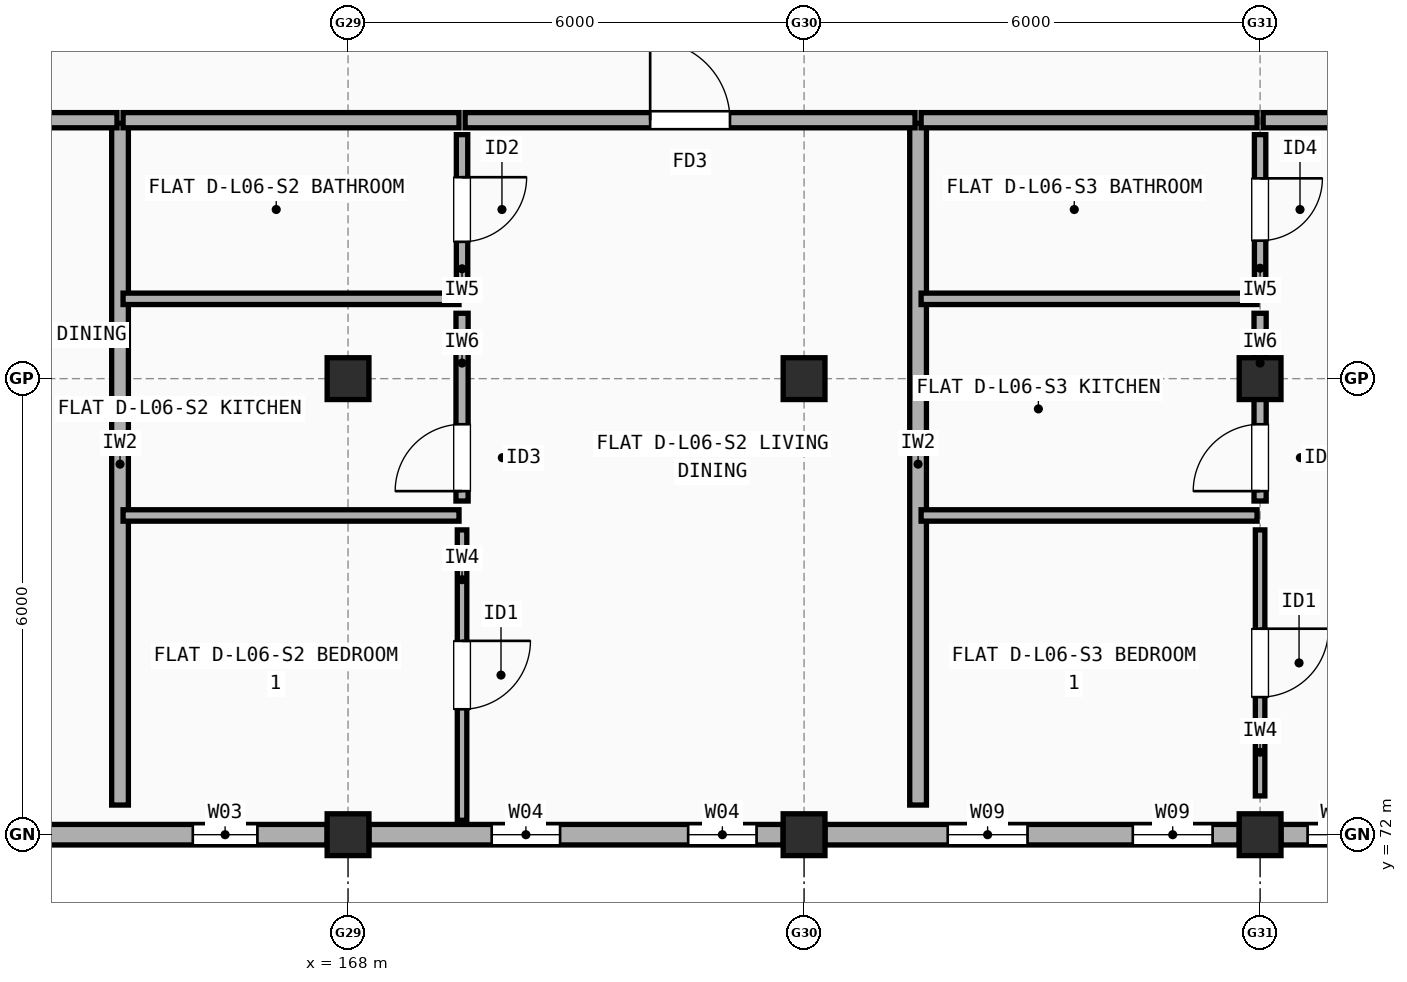
"""IFC4 building model, lengths in metres.
Left out: names, types, materials, properties, quantities, classifications, styles, units other than length and angle.
Written with IfcOpenShell. Run it as: python <this file> out.ifc"""

import sys

from ifc_helpers import new_model, si_unit, direction, frame, frame_2d, origin, origin_2d, place, context, subcontext, project, spatial, rectangle, extrude, element, fill, save


model = new_model("IFC4")
c1 = context("Model", 3, precision=1e-05, world=origin(), true_north=direction((0.0, 1.0)))
c2 = subcontext(c1, "Body", "Model", "MODEL_VIEW")
j1 = project(units=[si_unit("LENGTHUNIT", "METRE"), si_unit("PLANEANGLEUNIT", "RADIAN")], contexts=[c1])
p1 = place(None, origin())
s1 = spatial("IfcSite", under=j1, at=p1, CompositionType="ELEMENT")
p2 = place(p1, origin())
s2 = spatial("IfcBuilding", under=s1, at=p2, CompositionType="ELEMENT")
p3 = place(p2, frame((0.0, 0.0, 20.5)))
s3 = spatial("IfcBuildingStorey", under=s2, at=p3, CompositionType="ELEMENT", Elevation=20.5)
for number, where, z_axis, x_axis in (
    (1, (168.0, 72.0, 0.0), (0.0, 0.0, 1.0), (1.0, 0.0, 0.0)),
    (2, (168.0, 78.0, 0.0), (0.0, 0.0, 1.0), (1.0, 0.0, 0.0)),
    (3, (174.0, 72.0, 0.0), (0.0, 0.0, 1.0), (1.0, 0.0, 0.0)),
    (4, (174.0, 78.0, 0.0), (0.0, 0.0, 1.0), (1.0, 0.0, 0.0)),
    (5, (180.0, 72.0, 0.0), (0.0, 0.0, 1.0), (1.0, 0.0, 0.0)),
    (6, (180.0, 78.0, 0.0), (0.0, 0.0, 1.0), (1.0, 0.0, 0.0)),
):
    element("IfcColumn", number, at=place(p3, frame(where, z_axis=z_axis, x_axis=x_axis)), inside=s3, PredefinedType="COLUMN", context=c2, shape_type="SweptSolid", body=[
        extrude(rectangle(XDim=0.55, YDim=0.55, at=origin_2d()), origin(), (0.0, 0.0, 1.0), 2.97),
    ])
p4 = place(p3, frame((162.275, 72.0, 0.0), z_axis=(0.0, 0.0, 1.0), x_axis=(1.0, 0.0, 0.0)))
e7 = element("IfcWall", 7, at=p4, inside=s3, PredefinedType="STANDARD", context=c2, shape_type="SweptSolid", body=[
    extrude(rectangle(XDim=5.45, YDim=0.27, at=frame_2d((2.725, 0.0))), origin(), (0.0, 0.0, 1.0), 2.452),
])
p5 = place(p4, frame((0.942, 0.0, 0.9)))
e8 = element("IfcOpeningElement", 8, at=p5, cuts=e7, PredefinedType="OPENING", context=c2, shape_type="SweptSolid", body=[
    extrude(rectangle(XDim=0.8, YDim=1.2, at=frame_2d((0.4, 0.6))), frame((0.0, 0.145, 0.0), z_axis=(0.0, -1.0, 0.0), x_axis=(1.0, 0.0, 0.0)), (0.0, 0.0, 1.0), 0.29),
])
p6 = place(p4, frame((3.683, 0.0, 0.9)))
e9 = element("IfcOpeningElement", 9, at=p6, cuts=e7, PredefinedType="OPENING", context=c2, shape_type="SweptSolid", body=[
    extrude(rectangle(XDim=0.85, YDim=1.25, at=frame_2d((0.425, 0.625))), frame((0.0, 0.145, 0.0), z_axis=(0.0, -1.0, 0.0), x_axis=(1.0, 0.0, 0.0)), (0.0, 0.0, 1.0), 0.29),
])
p7 = place(p3, frame((168.275, 72.0, 0.0), z_axis=(0.0, 0.0, 1.0), x_axis=(1.0, 0.0, 0.0)))
e10 = element("IfcWall", 10, at=p7, inside=s3, PredefinedType="STANDARD", context=c2, shape_type="SweptSolid", body=[
    extrude(rectangle(XDim=5.45, YDim=0.27, at=frame_2d((2.725, 0.0))), origin(), (0.0, 0.0, 1.0), 2.452),
])
p8 = place(p7, frame((1.615, 0.0, 0.9)))
e11 = element("IfcOpeningElement", 11, at=p8, cuts=e10, PredefinedType="OPENING", context=c2, shape_type="SweptSolid", body=[
    extrude(rectangle(XDim=0.9, YDim=1.3, at=frame_2d((0.45, 0.65))), frame((0.0, 0.145, 0.0), z_axis=(0.0, -1.0, 0.0), x_axis=(1.0, 0.0, 0.0)), (0.0, 0.0, 1.0), 0.29),
])
p9 = place(p7, frame((4.2, 0.0, 0.9)))
e12 = element("IfcOpeningElement", 12, at=p9, cuts=e10, PredefinedType="OPENING", context=c2, shape_type="SweptSolid", body=[
    extrude(rectangle(XDim=0.9, YDim=1.3, at=frame_2d((0.45, 0.65))), frame((0.0, 0.145, 0.0), z_axis=(0.0, -1.0, 0.0), x_axis=(1.0, 0.0, 0.0)), (0.0, 0.0, 1.0), 0.29),
])
p10 = place(p3, frame((174.275, 72.0, 0.0), z_axis=(0.0, 0.0, 1.0), x_axis=(1.0, 0.0, 0.0)))
e13 = element("IfcWall", 13, at=p10, inside=s3, PredefinedType="STANDARD", context=c2, shape_type="SweptSolid", body=[
    extrude(rectangle(XDim=5.45, YDim=0.27, at=frame_2d((2.725, 0.0))), origin(), (0.0, 0.0, 1.0), 2.452),
])
p11 = place(p10, frame((1.615, 0.0, 0.9)))
e14 = element("IfcOpeningElement", 14, at=p11, cuts=e13, PredefinedType="OPENING", context=c2, shape_type="SweptSolid", body=[
    extrude(rectangle(XDim=1.05, YDim=1.35, at=frame_2d((0.525, 0.675))), frame((0.0, 0.145, 0.0), z_axis=(0.0, -1.0, 0.0), x_axis=(1.0, 0.0, 0.0)), (0.0, 0.0, 1.0), 0.29),
])
p12 = place(p10, frame((4.05, 0.0, 0.9)))
e15 = element("IfcOpeningElement", 15, at=p12, cuts=e13, PredefinedType="OPENING", context=c2, shape_type="SweptSolid", body=[
    extrude(rectangle(XDim=1.05, YDim=1.35, at=frame_2d((0.525, 0.675))), frame((0.0, 0.145, 0.0), z_axis=(0.0, -1.0, 0.0), x_axis=(1.0, 0.0, 0.0)), (0.0, 0.0, 1.0), 0.29),
])
p13 = place(p3, frame((180.275, 72.0, 0.0), z_axis=(0.0, 0.0, 1.0), x_axis=(1.0, 0.0, 0.0)))
e16 = element("IfcWall", 16, at=p13, inside=s3, PredefinedType="STANDARD", context=c2, shape_type="SweptSolid", body=[
    extrude(rectangle(XDim=5.475, YDim=0.27, at=frame_2d((2.738, 0.0))), origin(), (0.0, 0.0, 1.0), 2.452),
])
p14 = place(p13, frame((0.35, 0.0, 0.9)))
e17 = element("IfcOpeningElement", 17, at=p14, cuts=e16, PredefinedType="OPENING", context=c2, shape_type="SweptSolid", body=[
    extrude(rectangle(XDim=0.8, YDim=1.2, at=frame_2d((0.4, 0.6))), frame((0.0, 0.145, 0.0), z_axis=(0.0, -1.0, 0.0), x_axis=(1.0, 0.0, 0.0)), (0.0, 0.0, 1.0), 0.29),
])
p15 = place(p13, frame((4.325, 0.0, 0.9)))
e18 = element("IfcOpeningElement", 18, at=p15, cuts=e16, PredefinedType="OPENING", context=c2, shape_type="SweptSolid", body=[
    extrude(rectangle(XDim=0.8, YDim=1.2, at=frame_2d((0.4, 0.6))), frame((0.0, 0.145, 0.0), z_axis=(0.0, -1.0, 0.0), x_axis=(1.0, 0.0, 0.0)), (0.0, 0.0, 1.0), 0.29),
])
p16 = place(p3, frame((165.0, 72.39, 0.0), z_axis=(0.0, 0.0, 1.0), x_axis=(0.0, 1.0, 0.0)))
e19 = element("IfcWall", 19, at=p16, inside=s3, PredefinedType="SOLIDWALL", context=c2, shape_type="SweptSolid", body=[
    extrude(rectangle(XDim=8.97, YDim=0.22, at=frame_2d((4.485, 0.0))), origin(), (0.0, 0.0, 1.0), 2.452),
])
p17 = place(p3, frame((160.54, 81.4, 0.0), z_axis=(0.0, 0.0, 1.0), x_axis=(1.0, 0.0, 0.0)))
e20 = element("IfcWall", 20, at=p17, inside=s3, PredefinedType="SOLIDWALL", context=c2, shape_type="SweptSolid", body=[
    extrude(rectangle(XDim=4.42, YDim=0.2, at=frame_2d((2.21, 0.0))), origin(), (0.0, 0.0, 1.0), 2.458),
])
p18 = place(p17, frame((1.72, 0.0, 0.0)))
e21 = element("IfcOpeningElement", 21, at=p18, cuts=e20, PredefinedType="OPENING", context=c2, shape_type="SweptSolid", body=[
    extrude(rectangle(XDim=0.98, YDim=2.15, at=frame_2d((0.49, 1.075))), frame((0.0, 0.11, 0.0), z_axis=(0.0, -1.0, 0.0), x_axis=(1.0, 0.0, 0.0)), (0.0, 0.0, 1.0), 0.22),
])
p19 = place(p3, frame((175.5, 72.39, 0.0), z_axis=(0.0, 0.0, 1.0), x_axis=(0.0, 1.0, 0.0)))
e22 = element("IfcWall", 22, at=p19, inside=s3, PredefinedType="SOLIDWALL", context=c2, shape_type="SweptSolid", body=[
    extrude(rectangle(XDim=8.97, YDim=0.22, at=frame_2d((4.485, 0.0))), origin(), (0.0, 0.0, 1.0), 2.452),
])
p20 = place(p3, frame((165.04, 81.4, 0.0), z_axis=(0.0, 0.0, 1.0), x_axis=(1.0, 0.0, 0.0)))
e23 = element("IfcWall", 23, at=p20, inside=s3, PredefinedType="SOLIDWALL", context=c2, shape_type="SweptSolid", body=[
    extrude(rectangle(XDim=4.42, YDim=0.2, at=frame_2d((2.21, 0.0))), origin(), (0.0, 0.0, 1.0), 2.458),
])
p21 = place(p3, frame((169.54, 81.4, 0.0), z_axis=(0.0, 0.0, 1.0), x_axis=(1.0, 0.0, 0.0)))
e24 = element("IfcWall", 24, at=p21, inside=s3, PredefinedType="SOLIDWALL", context=c2, shape_type="SweptSolid", body=[
    extrude(rectangle(XDim=5.92, YDim=0.2, at=frame_2d((2.96, 0.0))), origin(), (0.0, 0.0, 1.0), 2.548),
])
p22 = place(p21, frame((2.435, 0.0, 0.0)))
e25 = element("IfcOpeningElement", 25, at=p22, cuts=e24, PredefinedType="OPENING", context=c2, shape_type="SweptSolid", body=[
    extrude(rectangle(XDim=1.05, YDim=2.15, at=frame_2d((0.525, 1.075))), frame((0.0, 0.11, 0.0), z_axis=(0.0, -1.0, 0.0), x_axis=(1.0, 0.0, 0.0)), (0.0, 0.0, 1.0), 0.22),
])
p23 = place(p3, frame((169.5, 72.19, 0.0), z_axis=(0.0, 0.0, 1.0), x_axis=(0.0, 1.0, 0.0)))
e26 = element("IfcWall", 26, at=p23, inside=s3, PredefinedType="PARTITIONING", context=c2, shape_type="SweptSolid", body=[
    extrude(rectangle(XDim=3.82, YDim=0.125, at=frame_2d((1.91, 0.0))), origin(), (0.0, 0.0, 1.0), 2.97),
])
p24 = place(p23, frame((1.46, 0.0, 0.0)))
e27 = element("IfcOpeningElement", 27, at=p24, cuts=e26, PredefinedType="OPENING", context=c2, shape_type="SweptSolid", body=[
    extrude(rectangle(XDim=0.9, YDim=2.1, at=frame_2d((0.45, 1.05))), frame((0.0, 0.073, 0.0), z_axis=(0.0, -1.0, 0.0), x_axis=(1.0, 0.0, 0.0)), (0.0, 0.0, 1.0), 0.145),
])
p25 = place(p3, frame((169.5, 76.39, 0.0), z_axis=(0.0, 0.0, 1.0), x_axis=(0.0, 1.0, 0.0)))
e28 = element("IfcWall", 28, at=p25, inside=s3, PredefinedType="PLUMBINGWALL", context=c2, shape_type="SweptSolid", body=[
    extrude(rectangle(XDim=2.47, YDim=0.16, at=frame_2d((1.235, 0.0))), origin(), (0.0, 0.0, 1.0), 2.452),
])
p26 = place(p25, frame((0.13, 0.0, 0.0)))
e29 = element("IfcOpeningElement", 29, at=p26, cuts=e28, PredefinedType="OPENING", context=c2, shape_type="SweptSolid", body=[
    extrude(rectangle(XDim=0.88, YDim=2.1, at=frame_2d((0.44, 1.05))), frame((0.0, 0.09, 0.0), z_axis=(0.0, -1.0, 0.0), x_axis=(1.0, 0.0, 0.0)), (0.0, 0.0, 1.0), 0.18),
])
p27 = place(p3, frame((169.5, 79.24, 0.0), z_axis=(0.0, 0.0, 1.0), x_axis=(0.0, 1.0, 0.0)))
e30 = element("IfcWall", 30, at=p27, inside=s3, PredefinedType="PARTITIONING", context=c2, shape_type="SweptSolid", body=[
    extrude(rectangle(XDim=1.97, YDim=0.15, at=frame_2d((0.985, 0.0))), origin(), (0.0, 0.0, 1.0), 2.97),
])
p28 = place(p27, frame((0.56, 0.0, 0.0)))
e31 = element("IfcOpeningElement", 31, at=p28, cuts=e30, PredefinedType="OPENING", context=c2, shape_type="SweptSolid", body=[
    extrude(rectangle(XDim=0.85, YDim=2.1, at=frame_2d((0.425, 1.05))), frame((0.0, 0.085, 0.0), z_axis=(0.0, -1.0, 0.0), x_axis=(1.0, 0.0, 0.0)), (0.0, 0.0, 1.0), 0.17),
])
p29 = place(p3, frame((165.04, 76.2, 0.0), z_axis=(0.0, 0.0, 1.0), x_axis=(1.0, 0.0, 0.0)))
e32 = element("IfcWall", 32, at=p29, inside=s3, PredefinedType="PARTITIONING", context=c2, shape_type="SweptSolid", body=[
    extrude(rectangle(XDim=4.42, YDim=0.15, at=frame_2d((2.21, 0.0))), origin(), (0.0, 0.0, 1.0), 2.508),
])
p30 = place(p3, frame((165.04, 79.05, 0.0), z_axis=(0.0, 0.0, 1.0), x_axis=(1.0, 0.0, 0.0)))
e33 = element("IfcWall", 33, at=p30, inside=s3, PredefinedType="PARTITIONING", context=c2, shape_type="SweptSolid", body=[
    extrude(rectangle(XDim=4.42, YDim=0.15, at=frame_2d((2.21, 0.0))), origin(), (0.0, 0.0, 1.0), 2.458),
])
p31 = place(p3, frame((175.54, 81.4, 0.0), z_axis=(0.0, 0.0, 1.0), x_axis=(1.0, 0.0, 0.0)))
e34 = element("IfcWall", 34, at=p31, inside=s3, PredefinedType="SOLIDWALL", context=c2, shape_type="SweptSolid", body=[
    extrude(rectangle(XDim=4.42, YDim=0.2, at=frame_2d((2.21, 0.0))), origin(), (0.0, 0.0, 1.0), 2.548),
])
p32 = place(p3, frame((180.04, 81.4, 0.0), z_axis=(0.0, 0.0, 1.0), x_axis=(1.0, 0.0, 0.0)))
e35 = element("IfcWall", 35, at=p32, inside=s3, PredefinedType="SOLIDWALL", context=c2, shape_type="SweptSolid", body=[
    extrude(rectangle(XDim=5.92, YDim=0.2, at=frame_2d((2.96, 0.0))), origin(), (0.0, 0.0, 1.0), 2.452),
])
p33 = place(p32, frame((2.46, 0.0, 0.0)))
e36 = element("IfcOpeningElement", 36, at=p33, cuts=e35, PredefinedType="OPENING", context=c2, shape_type="SweptSolid", body=[
    extrude(rectangle(XDim=1.0, YDim=2.15, at=frame_2d((0.5, 1.075))), frame((0.0, 0.11, 0.0), z_axis=(0.0, -1.0, 0.0), x_axis=(1.0, 0.0, 0.0)), (0.0, 0.0, 1.0), 0.22),
])
p34 = place(p3, frame((180.0, 72.51, 0.0), z_axis=(0.0, 0.0, 1.0), x_axis=(0.0, 1.0, 0.0)))
e37 = element("IfcWall", 37, at=p34, inside=s3, PredefinedType="PARTITIONING", context=c2, shape_type="SweptSolid", body=[
    extrude(rectangle(XDim=3.5, YDim=0.125, at=frame_2d((1.75, 0.0))), origin(), (0.0, 0.0, 1.0), 2.458),
])
p35 = place(p34, frame((1.3, 0.0, 0.0)))
e38 = element("IfcOpeningElement", 38, at=p35, cuts=e37, PredefinedType="OPENING", context=c2, shape_type="SweptSolid", body=[
    extrude(rectangle(XDim=0.9, YDim=2.1, at=frame_2d((0.45, 1.05))), frame((0.0, 0.073, 0.0), z_axis=(0.0, -1.0, 0.0), x_axis=(1.0, 0.0, 0.0)), (0.0, 0.0, 1.0), 0.145),
])
p36 = place(p3, frame((180.0, 76.39, 0.0), z_axis=(0.0, 0.0, 1.0), x_axis=(0.0, 1.0, 0.0)))
e39 = element("IfcWall", 39, at=p36, inside=s3, PredefinedType="PLUMBINGWALL", context=c2, shape_type="SweptSolid", body=[
    extrude(rectangle(XDim=2.47, YDim=0.16, at=frame_2d((1.235, 0.0))), origin(), (0.0, 0.0, 1.0), 2.458),
])
p37 = place(p36, frame((0.13, 0.0, 0.0)))
e40 = element("IfcOpeningElement", 40, at=p37, cuts=e39, PredefinedType="OPENING", context=c2, shape_type="SweptSolid", body=[
    extrude(rectangle(XDim=0.88, YDim=2.1, at=frame_2d((0.44, 1.05))), frame((0.0, 0.09, 0.0), z_axis=(0.0, -1.0, 0.0), x_axis=(1.0, 0.0, 0.0)), (0.0, 0.0, 1.0), 0.18),
])
p38 = place(p3, frame((180.0, 79.24, 0.0), z_axis=(0.0, 0.0, 1.0), x_axis=(0.0, 1.0, 0.0)))
e41 = element("IfcWall", 41, at=p38, inside=s3, PredefinedType="PARTITIONING", context=c2, shape_type="SweptSolid", body=[
    extrude(rectangle(XDim=1.97, YDim=0.15, at=frame_2d((0.985, 0.0))), origin(), (0.0, 0.0, 1.0), 2.548),
])
p39 = place(p38, frame((0.575, 0.0, 0.0)))
e42 = element("IfcOpeningElement", 42, at=p39, cuts=e41, PredefinedType="OPENING", context=c2, shape_type="SweptSolid", body=[
    extrude(rectangle(XDim=0.82, YDim=2.08, at=frame_2d((0.41, 1.04))), frame((0.0, 0.085, 0.0), z_axis=(0.0, -1.0, 0.0), x_axis=(1.0, 0.0, 0.0)), (0.0, 0.0, 1.0), 0.17),
])
p40 = place(p3, frame((175.54, 76.2, 0.0), z_axis=(0.0, 0.0, 1.0), x_axis=(1.0, 0.0, 0.0)))
e43 = element("IfcWall", 43, at=p40, inside=s3, PredefinedType="PARTITIONING", context=c2, shape_type="SweptSolid", body=[
    extrude(rectangle(XDim=4.42, YDim=0.15, at=frame_2d((2.21, 0.0))), origin(), (0.0, 0.0, 1.0), 2.458),
])
p41 = place(p3, frame((175.54, 79.05, 0.0), z_axis=(0.0, 0.0, 1.0), x_axis=(1.0, 0.0, 0.0)))
e44 = element("IfcWall", 44, at=p41, inside=s3, PredefinedType="PARTITIONING", context=c2, shape_type="SweptSolid", body=[
    extrude(rectangle(XDim=4.42, YDim=0.15, at=frame_2d((2.21, 0.0))), origin(), (0.0, 0.0, 1.0), 2.548),
])
p42 = place(p6, origin())
e45 = element("IfcWindow", 45, at=p42, inside=s3, PartitioningType="SINGLE_PANEL", PredefinedType="WINDOW", context=c2, shape_type="SweptSolid", body=[
    extrude(rectangle(XDim=0.85, YDim=1.25, at=frame_2d((0.425, 0.625))), frame((0.0, 0.03, 0.0), z_axis=(0.0, -1.0, 0.0), x_axis=(1.0, 0.0, 0.0)), (0.0, 0.0, 1.0), 0.06),
])
fill(e9, e45)
p43 = place(p8, origin())
e46 = element("IfcWindow", 46, at=p43, inside=s3, PartitioningType="SINGLE_PANEL", PredefinedType="WINDOW", context=c2, shape_type="SweptSolid", body=[
    extrude(rectangle(XDim=0.9, YDim=1.3, at=frame_2d((0.45, 0.65))), frame((0.0, 0.03, 0.0), z_axis=(0.0, -1.0, 0.0), x_axis=(1.0, 0.0, 0.0)), (0.0, 0.0, 1.0), 0.06),
])
fill(e11, e46)
p44 = place(p9, origin())
e47 = element("IfcWindow", 47, at=p44, inside=s3, PartitioningType="SINGLE_PANEL", PredefinedType="WINDOW", context=c2, shape_type="SweptSolid", body=[
    extrude(rectangle(XDim=0.9, YDim=1.3, at=frame_2d((0.45, 0.65))), frame((0.0, 0.03, 0.0), z_axis=(0.0, -1.0, 0.0), x_axis=(1.0, 0.0, 0.0)), (0.0, 0.0, 1.0), 0.06),
])
fill(e12, e47)
p45 = place(p11, origin())
e48 = element("IfcWindow", 48, at=p45, inside=s3, PartitioningType="SINGLE_PANEL", PredefinedType="WINDOW", context=c2, shape_type="SweptSolid", body=[
    extrude(rectangle(XDim=1.05, YDim=1.35, at=frame_2d((0.525, 0.675))), frame((0.0, 0.03, 0.0), z_axis=(0.0, -1.0, 0.0), x_axis=(1.0, 0.0, 0.0)), (0.0, 0.0, 1.0), 0.06),
])
fill(e14, e48)
p46 = place(p12, origin())
e49 = element("IfcWindow", 49, at=p46, inside=s3, PartitioningType="SINGLE_PANEL", PredefinedType="WINDOW", context=c2, shape_type="SweptSolid", body=[
    extrude(rectangle(XDim=1.05, YDim=1.35, at=frame_2d((0.525, 0.675))), frame((0.0, 0.03, 0.0), z_axis=(0.0, -1.0, 0.0), x_axis=(1.0, 0.0, 0.0)), (0.0, 0.0, 1.0), 0.06),
])
fill(e15, e49)
p47 = place(p14, origin())
e50 = element("IfcWindow", 50, at=p47, inside=s3, PartitioningType="SINGLE_PANEL", PredefinedType="WINDOW", context=c2, shape_type="SweptSolid", body=[
    extrude(rectangle(XDim=0.8, YDim=1.2, at=frame_2d((0.4, 0.6))), frame((0.0, 0.03, 0.0), z_axis=(0.0, -1.0, 0.0), x_axis=(1.0, 0.0, 0.0)), (0.0, 0.0, 1.0), 0.06),
])
fill(e17, e50)
p48 = place(p22, origin())
e51 = element("IfcDoor", 51, at=p48, inside=s3, OperationType="SINGLE_SWING_LEFT", PredefinedType="DOOR", context=c2, shape_type="SweptSolid", body=[
    extrude(rectangle(XDim=1.05, YDim=2.15, at=frame_2d((0.525, 1.075))), frame((0.0, 0.025, 0.0), z_axis=(0.0, -1.0, 0.0), x_axis=(1.0, 0.0, 0.0)), (0.0, 0.0, 1.0), 0.05),
])
fill(e25, e51)
p49 = place(p24, origin())
e52 = element("IfcDoor", 52, at=p49, inside=s3, OperationType="SINGLE_SWING_RIGHT", PredefinedType="DOOR", context=c2, shape_type="SweptSolid", body=[
    extrude(rectangle(XDim=0.9, YDim=2.1, at=frame_2d((0.45, 1.05))), frame((0.0, 0.025, 0.0), z_axis=(0.0, -1.0, 0.0), x_axis=(1.0, 0.0, 0.0)), (0.0, 0.0, 1.0), 0.05),
])
fill(e27, e52)
p50 = place(p26, origin())
e53 = element("IfcDoor", 53, at=p50, inside=s3, OperationType="SINGLE_SWING_LEFT", PredefinedType="DOOR", context=c2, shape_type="SweptSolid", body=[
    extrude(rectangle(XDim=0.88, YDim=2.1, at=frame_2d((0.44, 1.05))), frame((0.0, 0.025, 0.0), z_axis=(0.0, -1.0, 0.0), x_axis=(1.0, 0.0, 0.0)), (0.0, 0.0, 1.0), 0.05),
])
fill(e29, e53)
p51 = place(p28, origin())
e54 = element("IfcDoor", 54, at=p51, inside=s3, OperationType="SINGLE_SWING_RIGHT", PredefinedType="DOOR", context=c2, shape_type="SweptSolid", body=[
    extrude(rectangle(XDim=0.85, YDim=2.1, at=frame_2d((0.425, 1.05))), frame((0.0, 0.025, 0.0), z_axis=(0.0, -1.0, 0.0), x_axis=(1.0, 0.0, 0.0)), (0.0, 0.0, 1.0), 0.05),
])
fill(e31, e54)
p52 = place(p35, origin())
e55 = element("IfcDoor", 55, at=p52, inside=s3, OperationType="SINGLE_SWING_RIGHT", PredefinedType="DOOR", context=c2, shape_type="SweptSolid", body=[
    extrude(rectangle(XDim=0.9, YDim=2.1, at=frame_2d((0.45, 1.05))), frame((0.0, 0.025, 0.0), z_axis=(0.0, -1.0, 0.0), x_axis=(1.0, 0.0, 0.0)), (0.0, 0.0, 1.0), 0.05),
])
fill(e38, e55)
p53 = place(p37, origin())
e56 = element("IfcDoor", 56, at=p53, inside=s3, OperationType="SINGLE_SWING_LEFT", PredefinedType="DOOR", context=c2, shape_type="SweptSolid", body=[
    extrude(rectangle(XDim=0.88, YDim=2.1, at=frame_2d((0.44, 1.05))), frame((0.0, 0.025, 0.0), z_axis=(0.0, -1.0, 0.0), x_axis=(1.0, 0.0, 0.0)), (0.0, 0.0, 1.0), 0.05),
])
fill(e40, e56)
p54 = place(p39, origin())
e57 = element("IfcDoor", 57, at=p54, inside=s3, OperationType="SINGLE_SWING_RIGHT", PredefinedType="DOOR", context=c2, shape_type="SweptSolid", body=[
    extrude(rectangle(XDim=0.82, YDim=2.08, at=frame_2d((0.41, 1.04))), frame((0.0, 0.025, 0.0), z_axis=(0.0, -1.0, 0.0), x_axis=(1.0, 0.0, 0.0)), (0.0, 0.0, 1.0), 0.05),
])
fill(e42, e57)
save(model, sys.argv[1])
